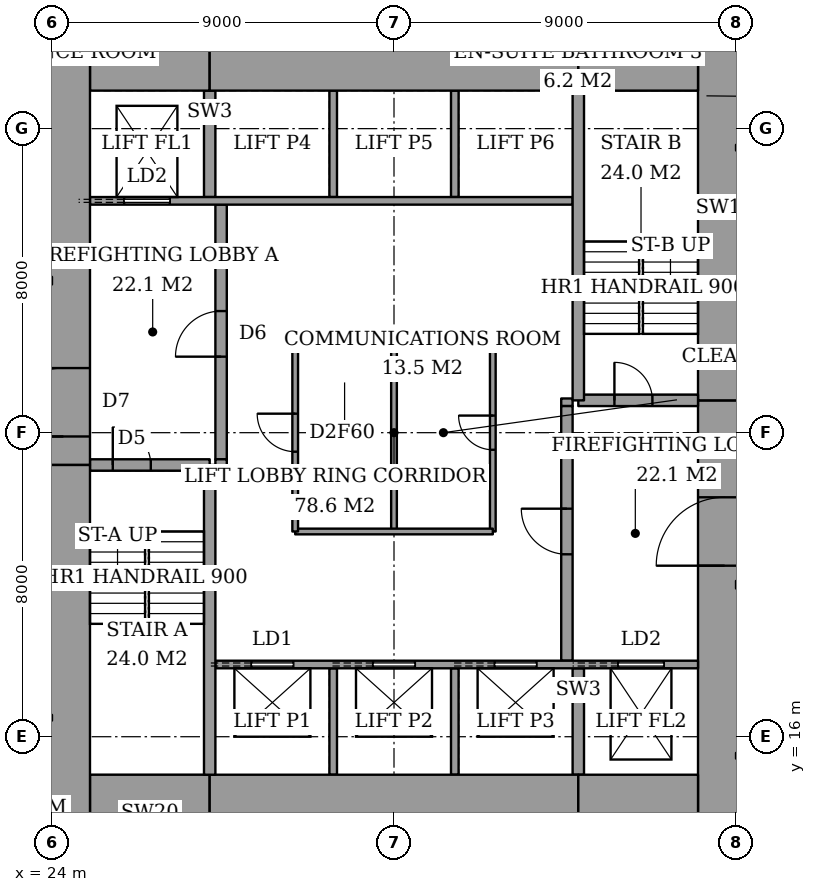
"""IFC4 building model, lengths in metres.
Left out: names, types, materials, properties, quantities, classifications, styles, units other than length and angle.
Written with IfcOpenShell. Run it as: python <this file> out.ifc"""

import sys

from ifc_helpers import new_model, si_unit, direction, frame, frame_2d, origin, place, context, subcontext, project, spatial, rectangle, extrude, element, fill, save


model = new_model("IFC4")
c1 = context("Model", 3, precision=1e-05, world=origin(), true_north=direction((0.0, 1.0)))
c2 = subcontext(c1, "Body", "Model", "MODEL_VIEW")
j1 = project(units=[si_unit("LENGTHUNIT", "METRE"), si_unit("PLANEANGLEUNIT", "RADIAN")], contexts=[c1])
p1 = place(None, origin())
s1 = spatial("IfcSite", under=j1, at=p1, CompositionType="ELEMENT")
p2 = place(p1, origin())
s2 = spatial("IfcBuilding", under=s1, at=p2, CompositionType="ELEMENT")
p3 = place(p2, frame((0.0, 0.0, 96.2)))
s3 = spatial("IfcBuildingStorey", under=s2, at=p3, CompositionType="ELEMENT", Elevation=96.2)
p4 = place(p3, frame((25.0, 14.0, 0.0), z_axis=(0.0, 0.0, 1.0), x_axis=(1.0, 0.0, 0.0)))
e1 = element("IfcWall", 1, at=p4, inside=s3, PredefinedType="SHEAR", context=c2, shape_type="SweptSolid", body=[
    extrude(rectangle(XDim=3.15, YDim=2.0, at=frame_2d((1.575, 0.0))), origin(), (0.0, 0.0, 1.0), 3.6),
])
p5 = place(p3, frame((28.15, 14.0, 0.0), z_axis=(0.0, 0.0, 1.0), x_axis=(1.0, 0.0, 0.0)))
e2 = element("IfcWall", 2, at=p5, inside=s3, PredefinedType="SHEAR", context=c2, shape_type="SweptSolid", body=[
    extrude(rectangle(XDim=9.7, YDim=2.0, at=frame_2d((4.85, 0.0))), origin(), (0.0, 0.0, 1.0), 3.6),
])
for number, where, z_axis, x_axis in (
    (3, (37.85, 14.0, 0.0), (0.0, 0.0, 1.0), (1.0, 0.0, 0.0)),
    (4, (25.0, 34.0, 0.0), (0.0, 0.0, 1.0), (1.0, 0.0, 0.0)),
):
    element("IfcWall", number, at=place(p3, frame(where, z_axis=z_axis, x_axis=x_axis)), inside=s3, PredefinedType="SHEAR", context=c2, shape_type="SweptSolid", body=[
        extrude(rectangle(XDim=3.15, YDim=2.0, at=frame_2d((1.575, 0.0))), origin(), (0.0, 0.0, 1.0), 3.6),
    ])
p6 = place(p3, frame((28.15, 34.0, 0.0), z_axis=(0.0, 0.0, 1.0), x_axis=(1.0, 0.0, 0.0)))
e5 = element("IfcWall", 5, at=p6, inside=s3, PredefinedType="SHEAR", context=c2, shape_type="SweptSolid", body=[
    extrude(rectangle(XDim=9.7, YDim=2.0, at=frame_2d((4.85, 0.0))), origin(), (0.0, 0.0, 1.0), 3.6),
])
p7 = place(p3, frame((37.85, 34.0, 0.0), z_axis=(0.0, 0.0, 1.0), x_axis=(1.0, 0.0, 0.0)))
e6 = element("IfcWall", 6, at=p7, inside=s3, PredefinedType="SHEAR", context=c2, shape_type="SweptSolid", body=[
    extrude(rectangle(XDim=3.15, YDim=2.0, at=frame_2d((1.575, 0.0))), origin(), (0.0, 0.0, 1.0), 3.6),
])
p8 = place(p3, frame((24.3, 13.0, 0.0), z_axis=(0.0, 0.0, 1.0), x_axis=(0.0, 1.0, 0.0)))
e7 = element("IfcWall", 7, at=p8, inside=s3, PredefinedType="SHEAR", context=c2, shape_type="SweptSolid", body=[
    extrude(rectangle(XDim=10.15, YDim=1.4, at=frame_2d((5.075, 0.0))), origin(), (0.0, 0.0, 1.0), 3.6),
])
p9 = place(p3, frame((24.3, 23.15, 0.0), z_axis=(0.0, 0.0, 1.0), x_axis=(0.0, 1.0, 0.0)))
e8 = element("IfcWall", 8, at=p9, inside=s3, PredefinedType="SHEAR", context=c2, shape_type="SweptSolid", body=[
    extrude(rectangle(XDim=11.85, YDim=1.4, at=frame_2d((5.925, 0.0))), origin(), (0.0, 0.0, 1.0), 3.6),
])
p10 = place(p9, frame((0.75, 0.0, 0.0)))
e9 = element("IfcOpeningElement", 9, at=p10, cuts=e8, PredefinedType="OPENING", context=c2, shape_type="SweptSolid", body=[
    extrude(rectangle(XDim=1.8, YDim=2.4, at=frame_2d((0.9, 1.2))), frame((0.0, 0.71, 0.0), z_axis=(0.0, -1.0, 0.0), x_axis=(1.0, 0.0, 0.0)), (0.0, 0.0, 1.0), 1.42),
])
p11 = place(p3, frame((41.7, 13.0, 0.0), z_axis=(0.0, 0.0, 1.0), x_axis=(0.0, 1.0, 0.0)))
e10 = element("IfcWall", 10, at=p11, inside=s3, PredefinedType="SHEAR", context=c2, shape_type="SweptSolid", body=[
    extrude(rectangle(XDim=11.85, YDim=1.4, at=frame_2d((5.925, 0.0))), origin(), (0.0, 0.0, 1.0), 3.6),
])
p12 = place(p11, frame((7.5, 0.0, 0.0)))
e11 = element("IfcOpeningElement", 11, at=p12, cuts=e10, PredefinedType="OPENING", context=c2, shape_type="SweptSolid", body=[
    extrude(rectangle(XDim=1.8, YDim=2.4, at=frame_2d((0.9, 1.2))), frame((0.0, 0.71, 0.0), z_axis=(0.0, -1.0, 0.0), x_axis=(1.0, 0.0, 0.0)), (0.0, 0.0, 1.0), 1.42),
])
p13 = place(p3, frame((41.7, 24.85, 0.0), z_axis=(0.0, 0.0, 1.0), x_axis=(0.0, 1.0, 0.0)))
e12 = element("IfcWall", 12, at=p13, inside=s3, PredefinedType="SHEAR", context=c2, shape_type="SweptSolid", body=[
    extrude(rectangle(XDim=10.15, YDim=1.4, at=frame_2d((5.075, 0.0))), origin(), (0.0, 0.0, 1.0), 3.6),
])
p14 = place(p3, frame((28.15, 15.0, 0.0), z_axis=(0.0, 0.0, 1.0), x_axis=(0.0, 1.0, 0.0)))
e13 = element("IfcWall", 13, at=p14, inside=s3, PredefinedType="SHEAR", context=c2, shape_type="SweptSolid", body=[
    extrude(rectangle(XDim=8.15, YDim=0.3, at=frame_2d((4.075, 0.0))), origin(), (0.0, 0.0, 1.0), 3.6),
])
p15 = place(p3, frame((25.0, 23.15, 0.0), z_axis=(0.0, 0.0, 1.0), x_axis=(1.0, 0.0, 0.0)))
e14 = element("IfcWall", 14, at=p15, inside=s3, PredefinedType="SHEAR", context=c2, shape_type="SweptSolid", body=[
    extrude(rectangle(XDim=3.15, YDim=0.3, at=frame_2d((1.575, 0.0))), origin(), (0.0, 0.0, 1.0), 3.6),
])
p16 = place(p15, frame((0.6, 0.0, 0.0)))
e15 = element("IfcOpeningElement", 15, at=p16, cuts=e14, PredefinedType="OPENING", context=c2, shape_type="SweptSolid", body=[
    extrude(rectangle(XDim=1.0, YDim=2.1, at=frame_2d((0.5, 1.05))), frame((0.0, 0.16, 0.0), z_axis=(0.0, -1.0, 0.0), x_axis=(1.0, 0.0, 0.0)), (0.0, 0.0, 1.0), 0.32),
])
p17 = place(p3, frame((37.85, 24.85, 0.0), z_axis=(0.0, 0.0, 1.0), x_axis=(0.0, 1.0, 0.0)))
e16 = element("IfcWall", 16, at=p17, inside=s3, PredefinedType="SHEAR", context=c2, shape_type="SweptSolid", body=[
    extrude(rectangle(XDim=8.15, YDim=0.3, at=frame_2d((4.075, 0.0))), origin(), (0.0, 0.0, 1.0), 3.6),
])
p18 = place(p3, frame((37.85, 24.85, 0.0), z_axis=(0.0, 0.0, 1.0), x_axis=(1.0, 0.0, 0.0)))
e17 = element("IfcWall", 17, at=p18, inside=s3, PredefinedType="SHEAR", context=c2, shape_type="SweptSolid", body=[
    extrude(rectangle(XDim=3.15, YDim=0.3, at=frame_2d((1.575, 0.0))), origin(), (0.0, 0.0, 1.0), 3.6),
])
p19 = place(p18, frame((0.95, 0.0, 0.0)))
e18 = element("IfcOpeningElement", 18, at=p19, cuts=e17, PredefinedType="OPENING", context=c2, shape_type="SweptSolid", body=[
    extrude(rectangle(XDim=1.0, YDim=2.1, at=frame_2d((0.5, 1.05))), frame((0.0, 0.16, 0.0), z_axis=(0.0, -1.0, 0.0), x_axis=(1.0, 0.0, 0.0)), (0.0, 0.0, 1.0), 0.32),
])
p20 = place(p3, frame((28.45, 23.3, 0.0), z_axis=(0.0, 0.0, 1.0), x_axis=(0.0, 1.0, 0.0)))
e19 = element("IfcWall", 19, at=p20, inside=s3, PredefinedType="PARTITIONING", context=c2, shape_type="SweptSolid", body=[
    extrude(rectangle(XDim=6.7, YDim=0.3, at=frame_2d((3.35, 0.0))), origin(), (0.0, 0.0, 1.0), 3.6),
])
p21 = place(p20, frame((2.7, 0.0, 0.0)))
e20 = element("IfcOpeningElement", 20, at=p21, cuts=e19, PredefinedType="OPENING", context=c2, shape_type="SweptSolid", body=[
    extrude(rectangle(XDim=1.2, YDim=2.1, at=frame_2d((0.6, 1.05))), frame((0.0, 0.16, 0.0), z_axis=(0.0, -1.0, 0.0), x_axis=(1.0, 0.0, 0.0)), (0.0, 0.0, 1.0), 0.32),
])
p22 = place(p3, frame((37.55, 18.0, 0.0), z_axis=(0.0, 0.0, 1.0), x_axis=(0.0, 1.0, 0.0)))
e21 = element("IfcWall", 21, at=p22, inside=s3, PredefinedType="PARTITIONING", context=c2, shape_type="SweptSolid", body=[
    extrude(rectangle(XDim=6.7, YDim=0.3, at=frame_2d((3.35, 0.0))), origin(), (0.0, 0.0, 1.0), 3.6),
])
p23 = place(p22, frame((2.8, 0.0, 0.0)))
e22 = element("IfcOpeningElement", 22, at=p23, cuts=e21, PredefinedType="OPENING", context=c2, shape_type="SweptSolid", body=[
    extrude(rectangle(XDim=1.2, YDim=2.1, at=frame_2d((0.6, 1.05))), frame((0.0, 0.16, 0.0), z_axis=(0.0, -1.0, 0.0), x_axis=(1.0, 0.0, 0.0)), (0.0, 0.0, 1.0), 0.32),
])
p24 = place(p3, frame((28.3, 17.9, 0.0), z_axis=(0.0, 0.0, 1.0), x_axis=(1.0, 0.0, 0.0)))
e23 = element("IfcWall", 23, at=p24, inside=s3, PredefinedType="PARTITIONING", context=c2, shape_type="SweptSolid", body=[
    extrude(rectangle(XDim=12.7, YDim=0.2, at=frame_2d((6.35, 0.0))), origin(), (0.0, 0.0, 1.0), 3.6),
])
p25 = place(p24, frame((0.95, 0.0, 0.0)))
e24 = element("IfcOpeningElement", 24, at=p25, cuts=e23, PredefinedType="OPENING", context=c2, shape_type="SweptSolid", body=[
    extrude(rectangle(XDim=1.1, YDim=2.1, at=frame_2d((0.55, 1.05))), frame((0.0, 0.11, 0.0), z_axis=(0.0, -1.0, 0.0), x_axis=(1.0, 0.0, 0.0)), (0.0, 0.0, 1.0), 0.22),
])
p26 = place(p24, frame((4.15, 0.0, 0.0)))
e25 = element("IfcOpeningElement", 25, at=p26, cuts=e23, PredefinedType="OPENING", context=c2, shape_type="SweptSolid", body=[
    extrude(rectangle(XDim=1.1, YDim=2.1, at=frame_2d((0.55, 1.05))), frame((0.0, 0.11, 0.0), z_axis=(0.0, -1.0, 0.0), x_axis=(1.0, 0.0, 0.0)), (0.0, 0.0, 1.0), 0.22),
])
p27 = place(p24, frame((7.35, 0.0, 0.0)))
e26 = element("IfcOpeningElement", 26, at=p27, cuts=e23, PredefinedType="OPENING", context=c2, shape_type="SweptSolid", body=[
    extrude(rectangle(XDim=1.1, YDim=2.1, at=frame_2d((0.55, 1.05))), frame((0.0, 0.11, 0.0), z_axis=(0.0, -1.0, 0.0), x_axis=(1.0, 0.0, 0.0)), (0.0, 0.0, 1.0), 0.22),
])
p28 = place(p24, frame((10.6, 0.0, 0.0)))
e27 = element("IfcOpeningElement", 27, at=p28, cuts=e23, PredefinedType="OPENING", context=c2, shape_type="SweptSolid", body=[
    extrude(rectangle(XDim=1.2, YDim=2.1, at=frame_2d((0.6, 1.05))), frame((0.0, 0.11, 0.0), z_axis=(0.0, -1.0, 0.0), x_axis=(1.0, 0.0, 0.0)), (0.0, 0.0, 1.0), 0.22),
])
p29 = place(p3, frame((25.0, 30.1, 0.0), z_axis=(0.0, 0.0, 1.0), x_axis=(1.0, 0.0, 0.0)))
e28 = element("IfcWall", 28, at=p29, inside=s3, PredefinedType="PARTITIONING", context=c2, shape_type="SweptSolid", body=[
    extrude(rectangle(XDim=12.7, YDim=0.2, at=frame_2d((6.35, 0.0))), origin(), (0.0, 0.0, 1.0), 3.6),
])
p30 = place(p29, frame((0.9, 0.0, 0.0)))
e29 = element("IfcOpeningElement", 29, at=p30, cuts=e28, PredefinedType="OPENING", context=c2, shape_type="SweptSolid", body=[
    extrude(rectangle(XDim=1.2, YDim=2.1, at=frame_2d((0.6, 1.05))), frame((0.0, 0.11, 0.0), z_axis=(0.0, -1.0, 0.0), x_axis=(1.0, 0.0, 0.0)), (0.0, 0.0, 1.0), 0.22),
])
for number, where, z_axis, x_axis in (
    (30, (31.4, 15.0, 0.0), (0.0, 0.0, 1.0), (0.0, 1.0, 0.0)),
    (31, (34.6, 15.0, 0.0), (0.0, 0.0, 1.0), (0.0, 1.0, 0.0)),
):
    element("IfcWall", number, at=place(p3, frame(where, z_axis=z_axis, x_axis=x_axis)), inside=s3, PredefinedType="PARTITIONING", context=c2, shape_type="SweptSolid", body=[
        extrude(rectangle(XDim=2.8, YDim=0.2, at=frame_2d((1.4, 0.0))), origin(), (0.0, 0.0, 1.0), 3.6),
    ])
p31 = place(p3, frame((37.85, 15.0, 0.0), z_axis=(0.0, 0.0, 1.0), x_axis=(0.0, 1.0, 0.0)))
e32 = element("IfcWall", 32, at=p31, inside=s3, PredefinedType="SHEAR", context=c2, shape_type="SweptSolid", body=[
    extrude(rectangle(XDim=2.8, YDim=0.3, at=frame_2d((1.4, 0.0))), origin(), (0.0, 0.0, 1.0), 3.6),
])
for number, where, z_axis, x_axis in (
    (33, (31.4, 30.2, 0.0), (0.0, 0.0, 1.0), (0.0, 1.0, 0.0)),
    (34, (34.6, 30.2, 0.0), (0.0, 0.0, 1.0), (0.0, 1.0, 0.0)),
):
    element("IfcWall", number, at=place(p3, frame(where, z_axis=z_axis, x_axis=x_axis)), inside=s3, PredefinedType="PARTITIONING", context=c2, shape_type="SweptSolid", body=[
        extrude(rectangle(XDim=2.8, YDim=0.2, at=frame_2d((1.4, 0.0))), origin(), (0.0, 0.0, 1.0), 3.6),
    ])
p32 = place(p3, frame((28.15, 30.2, 0.0), z_axis=(0.0, 0.0, 1.0), x_axis=(0.0, 1.0, 0.0)))
e35 = element("IfcWall", 35, at=p32, inside=s3, PredefinedType="SHEAR", context=c2, shape_type="SweptSolid", body=[
    extrude(rectangle(XDim=2.8, YDim=0.3, at=frame_2d((1.4, 0.0))), origin(), (0.0, 0.0, 1.0), 3.6),
])
for number, where, z_axis, x_axis in (
    (36, (28.3, 23.2, 0.0), (0.0, 0.0, 1.0), (1.0, 0.0, 0.0)),
    (37, (37.4, 24.8, 0.0), (0.0, 0.0, 1.0), (1.0, 0.0, 0.0)),
):
    element("IfcWall", number, at=place(p3, frame(where, z_axis=z_axis, x_axis=x_axis)), inside=s3, PredefinedType="PARTITIONING", context=c2, shape_type="SweptSolid", body=[
        extrude(rectangle(XDim=0.3, YDim=0.2, at=frame_2d((0.15, 0.0))), origin(), (0.0, 0.0, 1.0), 3.6),
    ])
for number, where, z_axis, x_axis in (
    (38, (30.4, 21.4, 0.0), (0.0, 0.0, 1.0), (1.0, 0.0, 0.0)),
    (39, (30.4, 26.6, 0.0), (0.0, 0.0, 1.0), (1.0, 0.0, 0.0)),
):
    element("IfcWall", number, at=place(p3, frame(where, z_axis=z_axis, x_axis=x_axis)), inside=s3, PredefinedType="PARTITIONING", context=c2, shape_type="SweptSolid", body=[
        extrude(rectangle(XDim=5.2, YDim=0.15, at=frame_2d((2.6, 0.0))), origin(), (0.0, 0.0, 1.0), 3.35),
    ])
p33 = place(p3, frame((30.4, 21.4, 0.0), z_axis=(0.0, 0.0, 1.0), x_axis=(0.0, 1.0, 0.0)))
e40 = element("IfcWall", 40, at=p33, inside=s3, PredefinedType="PARTITIONING", context=c2, shape_type="SweptSolid", body=[
    extrude(rectangle(XDim=5.2, YDim=0.15, at=frame_2d((2.6, 0.0))), origin(), (0.0, 0.0, 1.0), 3.35),
])
p34 = place(p33, frame((2.1, 0.0, 0.0)))
e41 = element("IfcOpeningElement", 41, at=p34, cuts=e40, PredefinedType="OPENING", context=c2, shape_type="SweptSolid", body=[
    extrude(rectangle(XDim=1.0, YDim=2.1, at=frame_2d((0.5, 1.05))), frame((0.0, 0.085, 0.0), z_axis=(0.0, -1.0, 0.0), x_axis=(1.0, 0.0, 0.0)), (0.0, 0.0, 1.0), 0.17),
])
p35 = place(p3, frame((35.6, 21.4, 0.0), z_axis=(0.0, 0.0, 1.0), x_axis=(0.0, 1.0, 0.0)))
e42 = element("IfcWall", 42, at=p35, inside=s3, PredefinedType="PARTITIONING", context=c2, shape_type="SweptSolid", body=[
    extrude(rectangle(XDim=5.2, YDim=0.15, at=frame_2d((2.6, 0.0))), origin(), (0.0, 0.0, 1.0), 3.35),
])
p36 = place(p35, frame((2.15, 0.0, 0.0)))
e43 = element("IfcOpeningElement", 43, at=p36, cuts=e42, PredefinedType="OPENING", context=c2, shape_type="SweptSolid", body=[
    extrude(rectangle(XDim=0.9, YDim=2.1, at=frame_2d((0.45, 1.05))), frame((0.0, 0.085, 0.0), z_axis=(0.0, -1.0, 0.0), x_axis=(1.0, 0.0, 0.0)), (0.0, 0.0, 1.0), 0.17),
])
p37 = place(p3, frame((33.0, 21.4, 0.0), z_axis=(0.0, 0.0, 1.0), x_axis=(0.0, 1.0, 0.0)))
e44 = element("IfcWall", 44, at=p37, inside=s3, PredefinedType="PARTITIONING", context=c2, shape_type="SweptSolid", body=[
    extrude(rectangle(XDim=5.2, YDim=0.15, at=frame_2d((2.6, 0.0))), origin(), (0.0, 0.0, 1.0), 3.35),
])
p38 = place(p16, origin())
e45 = element("IfcDoor", 45, at=p38, inside=s3, OperationType="SINGLE_SWING_RIGHT", PredefinedType="DOOR", context=c2, shape_type="SweptSolid", body=[
    extrude(rectangle(XDim=1.0, YDim=2.1, at=frame_2d((0.5, 1.05))), frame((0.0, 0.025, 0.0), z_axis=(0.0, -1.0, 0.0), x_axis=(1.0, 0.0, 0.0)), (0.0, 0.0, 1.0), 0.05),
])
fill(e15, e45)
p39 = place(p19, origin())
e46 = element("IfcDoor", 46, at=p39, inside=s3, OperationType="SINGLE_SWING_RIGHT", PredefinedType="DOOR", context=c2, shape_type="SweptSolid", body=[
    extrude(rectangle(XDim=1.0, YDim=2.1, at=frame_2d((0.5, 1.05))), frame((0.0, 0.025, 0.0), z_axis=(0.0, -1.0, 0.0), x_axis=(1.0, 0.0, 0.0)), (0.0, 0.0, 1.0), 0.05),
])
fill(e18, e46)
p40 = place(p21, origin())
e47 = element("IfcDoor", 47, at=p40, inside=s3, OperationType="SINGLE_SWING_RIGHT", PredefinedType="DOOR", context=c2, shape_type="SweptSolid", body=[
    extrude(rectangle(XDim=1.2, YDim=2.1, at=frame_2d((0.6, 1.05))), frame((0.0, 0.025, 0.0), z_axis=(0.0, -1.0, 0.0), x_axis=(1.0, 0.0, 0.0)), (0.0, 0.0, 1.0), 0.05),
])
fill(e20, e47)
p41 = place(p23, origin())
e48 = element("IfcDoor", 48, at=p41, inside=s3, OperationType="SINGLE_SWING_LEFT", PredefinedType="DOOR", context=c2, shape_type="SweptSolid", body=[
    extrude(rectangle(XDim=1.2, YDim=2.1, at=frame_2d((0.6, 1.05))), frame((0.0, 0.025, 0.0), z_axis=(0.0, -1.0, 0.0), x_axis=(1.0, 0.0, 0.0)), (0.0, 0.0, 1.0), 0.05),
])
fill(e22, e48)
p42 = place(p10, origin())
e49 = element("IfcDoor", 49, at=p42, inside=s3, OperationType="DOUBLE_DOOR_DOUBLE_SWING", PredefinedType="DOOR", context=c2, shape_type="SweptSolid", body=[
    extrude(rectangle(XDim=1.8, YDim=2.4, at=frame_2d((0.9, 1.2))), frame((0.0, 0.025, 0.0), z_axis=(0.0, -1.0, 0.0), x_axis=(1.0, 0.0, 0.0)), (0.0, 0.0, 1.0), 0.05),
])
fill(e9, e49)
p43 = place(p12, origin())
e50 = element("IfcDoor", 50, at=p43, inside=s3, OperationType="DOUBLE_DOOR_DOUBLE_SWING", PredefinedType="DOOR", context=c2, shape_type="SweptSolid", body=[
    extrude(rectangle(XDim=1.8, YDim=2.4, at=frame_2d((0.9, 1.2))), frame((0.0, 0.025, 0.0), z_axis=(0.0, -1.0, 0.0), x_axis=(1.0, 0.0, 0.0)), (0.0, 0.0, 1.0), 0.05),
])
fill(e11, e50)
p44 = place(p34, origin())
e51 = element("IfcDoor", 51, at=p44, inside=s3, OperationType="SINGLE_SWING_LEFT", PredefinedType="DOOR", context=c2, shape_type="SweptSolid", body=[
    extrude(rectangle(XDim=1.0, YDim=2.1, at=frame_2d((0.5, 1.05))), frame((0.0, 0.025, 0.0), z_axis=(0.0, -1.0, 0.0), x_axis=(1.0, 0.0, 0.0)), (0.0, 0.0, 1.0), 0.05),
])
fill(e41, e51)
p45 = place(p36, origin())
e52 = element("IfcDoor", 52, at=p45, inside=s3, OperationType="SINGLE_SWING_LEFT", PredefinedType="DOOR", context=c2, shape_type="SweptSolid", body=[
    extrude(rectangle(XDim=0.9, YDim=2.1, at=frame_2d((0.45, 1.05))), frame((0.0, 0.025, 0.0), z_axis=(0.0, -1.0, 0.0), x_axis=(1.0, 0.0, 0.0)), (0.0, 0.0, 1.0), 0.05),
])
fill(e43, e52)
p46 = place(p25, origin())
e53 = element("IfcDoor", 53, at=p46, inside=s3, OperationType="SLIDING_TO_LEFT", PredefinedType="DOOR", context=c2, shape_type="SweptSolid", body=[
    extrude(rectangle(XDim=1.1, YDim=2.1, at=frame_2d((0.55, 1.05))), frame((0.0, 0.025, 0.0), z_axis=(0.0, -1.0, 0.0), x_axis=(1.0, 0.0, 0.0)), (0.0, 0.0, 1.0), 0.05),
])
fill(e24, e53)
p47 = place(p26, origin())
e54 = element("IfcDoor", 54, at=p47, inside=s3, OperationType="SLIDING_TO_LEFT", PredefinedType="DOOR", context=c2, shape_type="SweptSolid", body=[
    extrude(rectangle(XDim=1.1, YDim=2.1, at=frame_2d((0.55, 1.05))), frame((0.0, 0.025, 0.0), z_axis=(0.0, -1.0, 0.0), x_axis=(1.0, 0.0, 0.0)), (0.0, 0.0, 1.0), 0.05),
])
fill(e25, e54)
p48 = place(p27, origin())
e55 = element("IfcDoor", 55, at=p48, inside=s3, OperationType="SLIDING_TO_LEFT", PredefinedType="DOOR", context=c2, shape_type="SweptSolid", body=[
    extrude(rectangle(XDim=1.1, YDim=2.1, at=frame_2d((0.55, 1.05))), frame((0.0, 0.025, 0.0), z_axis=(0.0, -1.0, 0.0), x_axis=(1.0, 0.0, 0.0)), (0.0, 0.0, 1.0), 0.05),
])
fill(e26, e55)
p49 = place(p30, origin())
e56 = element("IfcDoor", 56, at=p49, inside=s3, OperationType="SLIDING_TO_LEFT", PredefinedType="DOOR", context=c2, shape_type="SweptSolid", body=[
    extrude(rectangle(XDim=1.2, YDim=2.1, at=frame_2d((0.6, 1.05))), frame((0.0, 0.025, 0.0), z_axis=(0.0, -1.0, 0.0), x_axis=(1.0, 0.0, 0.0)), (0.0, 0.0, 1.0), 0.05),
])
fill(e29, e56)
p50 = place(p28, origin())
e57 = element("IfcDoor", 57, at=p50, inside=s3, OperationType="SLIDING_TO_LEFT", PredefinedType="DOOR", context=c2, shape_type="SweptSolid", body=[
    extrude(rectangle(XDim=1.2, YDim=2.1, at=frame_2d((0.6, 1.05))), frame((0.0, 0.025, 0.0), z_axis=(0.0, -1.0, 0.0), x_axis=(1.0, 0.0, 0.0)), (0.0, 0.0, 1.0), 0.05),
])
fill(e27, e57)
save(model, sys.argv[1])
